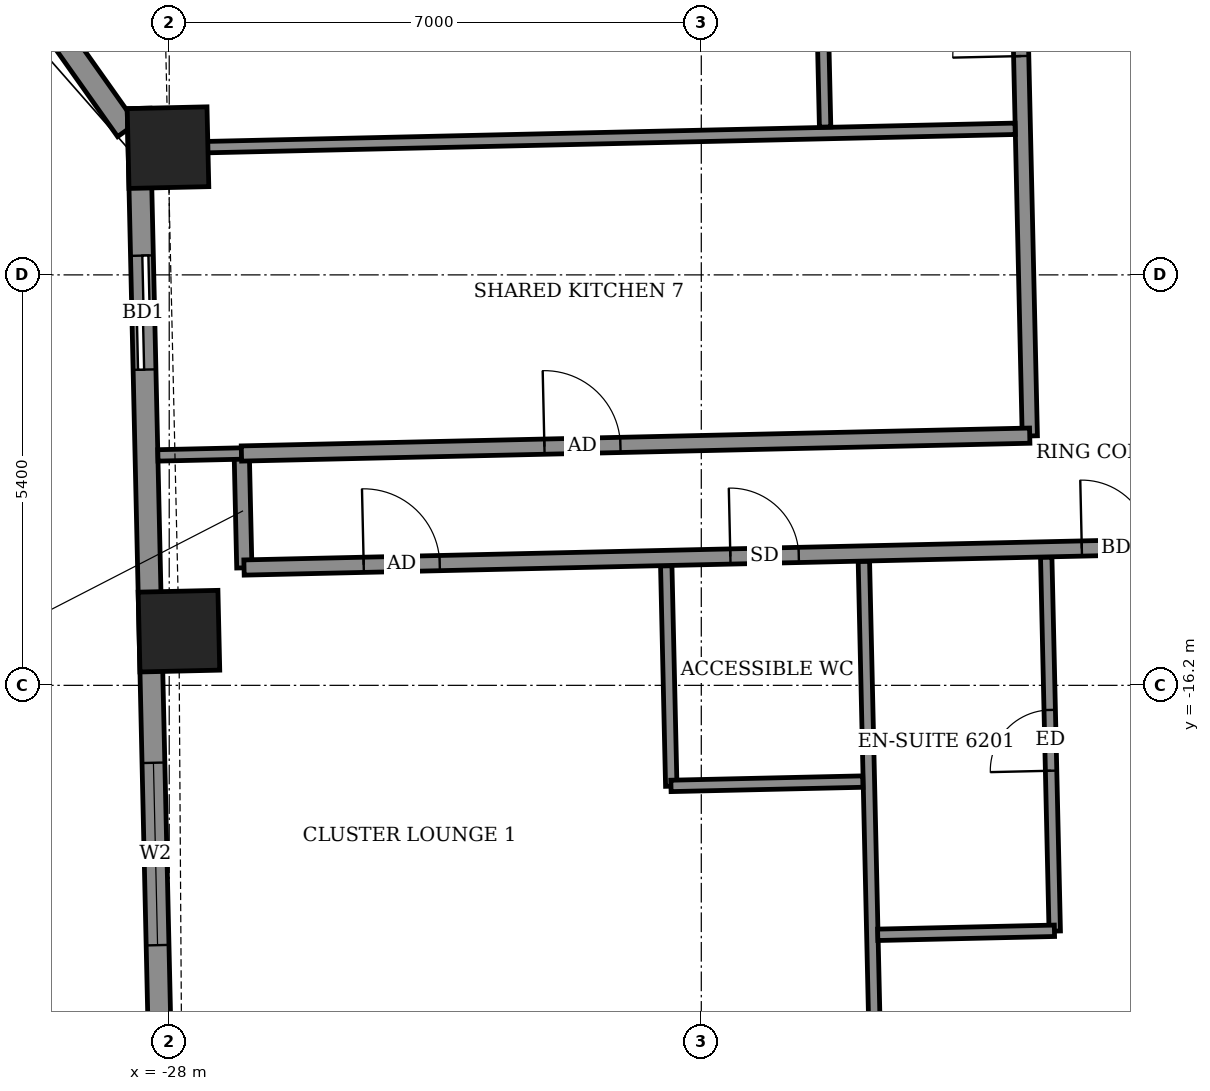
"""IFC4 building model, lengths in metres.
Left out: names, types, materials, properties, quantities, classifications, styles, units other than length and angle.
Written with IfcOpenShell. Run it as: python <this file> out.ifc"""

import sys

from ifc_helpers import new_model, si_unit, direction, frame, frame_2d, origin, origin_2d, place, context, subcontext, project, spatial, rectangle, extrude, element, fill, save


model = new_model("IFC4")
c1 = context("Model", 3, precision=1e-05, world=origin(), true_north=direction((0.0, 1.0)))
c2 = subcontext(c1, "Body", "Model", "MODEL_VIEW")
j1 = project(units=[si_unit("LENGTHUNIT", "METRE"), si_unit("PLANEANGLEUNIT", "RADIAN")], contexts=[c1])
p1 = place(None, origin())
s1 = spatial("IfcSite", under=j1, at=p1, CompositionType="ELEMENT")
p2 = place(p1, origin())
s2 = spatial("IfcBuilding", under=s1, at=p2, CompositionType="ELEMENT")
p3 = place(p2, frame((0.0, 0.0, 245.5)))
s3 = spatial("IfcBuildingStorey", under=s2, at=p3, CompositionType="ELEMENT", Elevation=245.5)
for number, where, z_axis, x_axis in (
    (1, (-28.016, -9.126, -0.55), (0.0, 0.0, 1.0), (0.023, -1.0, 0.0)),
    (2, (-27.872, -15.487, -0.55), (0.0, 0.0, 1.0), (0.023, -1.0, 0.0)),
):
    element("IfcColumn", number, at=place(p3, frame(where, z_axis=z_axis, x_axis=x_axis)), inside=s3, PredefinedType="COLUMN", context=c2, shape_type="SweptSolid", body=[
        extrude(rectangle(XDim=1.05, YDim=1.05, at=origin_2d()), origin(), (0.0, 0.0, 1.0), 3.6),
    ])
p4 = place(p3, frame((-30.62, -5.982, 0.0), z_axis=(0.0, 0.0, 1.0), x_axis=(0.578108441206, -0.815959943996, 0.0)))
e3 = element("IfcWall", 3, at=p4, inside=s3, PredefinedType="SOLIDWALL", context=c2, shape_type="SweptSolid", body=[
    extrude(rectangle(XDim=3.569, YDim=0.3, at=frame_2d((1.784, 0.0))), origin(), (0.0, 0.0, 1.0), 3.05),
])
p5 = place(p4, frame((0.338, 0.0, 0.9)))
e4 = element("IfcOpeningElement", 4, at=p5, cuts=e3, PredefinedType="OPENING", context=c2, shape_type="SweptSolid", body=[
    extrude(rectangle(XDim=1.2, YDim=1.5, at=frame_2d((0.6, 0.75))), frame((0.0, 0.16, 0.0), z_axis=(0.0, -1.0, 0.0), x_axis=(1.0, 0.0, 0.0)), (0.0, 0.0, 1.0), 0.32),
])
p6 = place(p3, frame((-28.403, -8.61, 0.0), z_axis=(0.0, 0.0, 1.0), x_axis=(0.022680342038, -0.999742767958, 0.0)))
e5 = element("IfcWall", 5, at=p6, inside=s3, PredefinedType="SOLIDWALL", context=c2, shape_type="SweptSolid", body=[
    extrude(rectangle(XDim=13.1, YDim=0.3, at=frame_2d((6.55, 0.0))), origin(), (0.0, 0.0, 1.0), 2.55),
])
p7 = place(p6, frame((1.937, 0.0, 0.0)))
e6 = element("IfcOpeningElement", 6, at=p7, cuts=e5, PredefinedType="OPENING", context=c2, shape_type="SweptSolid", body=[
    extrude(rectangle(XDim=1.5, YDim=2.4, at=frame_2d((0.75, 1.2))), frame((0.0, 0.16, 0.0), z_axis=(0.0, -1.0, 0.0), x_axis=(1.0, 0.0, 0.0)), (0.0, 0.0, 1.0), 0.32),
])
p8 = place(p6, frame((8.611, 0.0, 0.9)))
e7 = element("IfcOpeningElement", 7, at=p8, cuts=e5, PredefinedType="OPENING", context=c2, shape_type="SweptSolid", body=[
    extrude(rectangle(XDim=2.4, YDim=1.5, at=frame_2d((1.2, 0.75))), frame((0.0, 0.16, 0.0), z_axis=(0.0, -1.0, 0.0), x_axis=(1.0, 0.0, 0.0)), (0.0, 0.0, 1.0), 0.32),
])
p9 = place(p3, frame((-18.603, -25.942, 0.0), z_axis=(0.0, 0.0, 1.0), x_axis=(-0.022684842063, 0.99974266586, 0.0)))
e8 = element("IfcWall", 8, at=p9, inside=s3, PredefinedType="PARTITIONING", context=c2, shape_type="SweptSolid", body=[
    extrude(rectangle(XDim=11.376, YDim=0.15, at=frame_2d((5.688, 0.0))), origin(), (0.0, 0.0, 1.0), 2.55),
])
p10 = place(p3, frame((-16.35, -19.433, 0.0), z_axis=(0.0, 0.0, 1.0), x_axis=(-0.022724786614, 0.999741758692, 0.0)))
e9 = element("IfcWall", 9, at=p10, inside=s3, PredefinedType="PARTITIONING", context=c2, shape_type="SweptSolid", body=[
    extrude(rectangle(XDim=4.92, YDim=0.15, at=frame_2d((2.46, 0.0))), origin(), (0.0, 0.0, 1.0), 3.05),
])
p11 = place(p10, frame((2.11, 0.0, 0.0)))
e10 = element("IfcOpeningElement", 10, at=p11, cuts=e9, PredefinedType="OPENING", context=c2, shape_type="SweptSolid", body=[
    extrude(rectangle(XDim=0.8, YDim=2.1, at=frame_2d((0.4, 1.05))), frame((0.0, 0.085, 0.0), z_axis=(0.0, -1.0, 0.0), x_axis=(1.0, 0.0, 0.0)), (0.0, 0.0, 1.0), 0.17),
])
p12 = place(p3, frame((-18.679, -19.482, 0.0), z_axis=(0.0, 0.0, 1.0), x_axis=(0.999740478815, 0.022781023197, 0.0)))
e11 = element("IfcWall", 11, at=p12, inside=s3, PredefinedType="PARTITIONING", context=c2, shape_type="SweptSolid", body=[
    extrude(rectangle(XDim=2.325, YDim=0.15, at=frame_2d((1.163, 0.0))), origin(), (0.0, 0.0, 1.0), 3.05),
])
p13 = place(p3, frame((-21.395, -17.527, 0.0), z_axis=(0.0, 0.0, 1.0), x_axis=(-0.022730967319, 0.999741618182, 0.0)))
e12 = element("IfcWall", 12, at=p13, inside=s3, PredefinedType="PARTITIONING", context=c2, shape_type="SweptSolid", body=[
    extrude(rectangle(XDim=2.9, YDim=0.15, at=frame_2d((1.45, 0.0))), origin(), (0.0, 0.0, 1.0), 3.05),
])
p14 = place(p3, frame((-21.399, -17.523, 0.0), z_axis=(0.0, 0.0, 1.0), x_axis=(0.9997461113, 0.022532486354, 0.0)))
e13 = element("IfcWall", 13, at=p14, inside=s3, PredefinedType="PARTITIONING", context=c2, shape_type="SweptSolid", body=[
    extrude(rectangle(XDim=2.525, YDim=0.15, at=frame_2d((1.262, 0.0))), origin(), (0.0, 0.0, 1.0), 3.05),
])
p15 = place(p3, frame((-27.012, -14.654, 0.0), z_axis=(0.0, 0.0, 1.0), x_axis=(-0.022617910375, 0.999744182344, 0.0)))
e14 = element("IfcWall", 14, at=p15, inside=s3, PredefinedType="PARTITIONING", context=c2, shape_type="SweptSolid", body=[
    extrude(rectangle(XDim=1.5, YDim=0.2, at=frame_2d((0.75, 0.0))), origin(), (0.0, 0.0, 1.0), 3.05),
])
p16 = place(p3, frame((-27.016, -14.65, 0.0), z_axis=(0.0, 0.0, 1.0), x_axis=(0.999742874861, 0.022675629315, 0.0)))
e15 = element("IfcWall", 15, at=p16, inside=s3, PredefinedType="PARTITIONING", context=c2, shape_type="SweptSolid", body=[
    extrude(rectangle(XDim=50.883, YDim=0.2, at=frame_2d((25.442, 0.0))), origin(), (0.0, 0.0, 1.0), 3.05),
])
p17 = place(p16, frame((1.575, 0.0, 0.0)))
e16 = element("IfcOpeningElement", 16, at=p17, cuts=e15, PredefinedType="OPENING", context=c2, shape_type="SweptSolid", body=[
    extrude(rectangle(XDim=1.0, YDim=2.1, at=frame_2d((0.5, 1.05))), frame((0.0, 0.11, 0.0), z_axis=(0.0, -1.0, 0.0), x_axis=(1.0, 0.0, 0.0)), (0.0, 0.0, 1.0), 0.22),
])
p18 = place(p16, frame((6.4, 0.0, 0.0)))
e17 = element("IfcOpeningElement", 17, at=p18, cuts=e15, PredefinedType="OPENING", context=c2, shape_type="SweptSolid", body=[
    extrude(rectangle(XDim=0.9, YDim=2.1, at=frame_2d((0.45, 1.05))), frame((0.0, 0.11, 0.0), z_axis=(0.0, -1.0, 0.0), x_axis=(1.0, 0.0, 0.0)), (0.0, 0.0, 1.0), 0.22),
])
p19 = place(p16, frame((11.025, 0.0, 0.0)))
e18 = element("IfcOpeningElement", 18, at=p19, cuts=e15, PredefinedType="OPENING", context=c2, shape_type="SweptSolid", body=[
    extrude(rectangle(XDim=0.9, YDim=2.1, at=frame_2d((0.45, 1.05))), frame((0.0, 0.11, 0.0), z_axis=(0.0, -1.0, 0.0), x_axis=(1.0, 0.0, 0.0)), (0.0, 0.0, 1.0), 0.22),
])
p20 = place(p16, frame((12.925, 0.0, 0.0)))
e19 = element("IfcOpeningElement", 19, at=p20, cuts=e15, PredefinedType="OPENING", context=c2, shape_type="SweptSolid", body=[
    extrude(rectangle(XDim=0.9, YDim=2.1, at=frame_2d((0.45, 1.05))), frame((0.0, 0.11, 0.0), z_axis=(0.0, -1.0, 0.0), x_axis=(1.0, 0.0, 0.0)), (0.0, 0.0, 1.0), 0.22),
])
p21 = place(p16, frame((19.65, 0.0, 0.0)))
e20 = element("IfcOpeningElement", 20, at=p21, cuts=e15, PredefinedType="OPENING", context=c2, shape_type="SweptSolid", body=[
    extrude(rectangle(XDim=0.9, YDim=2.1, at=frame_2d((0.45, 1.05))), frame((0.0, 0.11, 0.0), z_axis=(0.0, -1.0, 0.0), x_axis=(1.0, 0.0, 0.0)), (0.0, 0.0, 1.0), 0.22),
])
p22 = place(p16, frame((21.575, 0.0, 0.0)))
e21 = element("IfcOpeningElement", 21, at=p22, cuts=e15, PredefinedType="OPENING", context=c2, shape_type="SweptSolid", body=[
    extrude(rectangle(XDim=0.9, YDim=2.1, at=frame_2d((0.45, 1.05))), frame((0.0, 0.11, 0.0), z_axis=(0.0, -1.0, 0.0), x_axis=(1.0, 0.0, 0.0)), (0.0, 0.0, 1.0), 0.22),
])
p23 = place(p16, frame((28.25, 0.0, 0.0)))
e22 = element("IfcOpeningElement", 22, at=p23, cuts=e15, PredefinedType="OPENING", context=c2, shape_type="SweptSolid", body=[
    extrude(rectangle(XDim=0.9, YDim=2.1, at=frame_2d((0.45, 1.05))), frame((0.0, 0.11, 0.0), z_axis=(0.0, -1.0, 0.0), x_axis=(1.0, 0.0, 0.0)), (0.0, 0.0, 1.0), 0.22),
])
p24 = place(p16, frame((30.125, 0.0, 0.0)))
e23 = element("IfcOpeningElement", 23, at=p24, cuts=e15, PredefinedType="OPENING", context=c2, shape_type="SweptSolid", body=[
    extrude(rectangle(XDim=0.9, YDim=2.1, at=frame_2d((0.45, 1.05))), frame((0.0, 0.11, 0.0), z_axis=(0.0, -1.0, 0.0), x_axis=(1.0, 0.0, 0.0)), (0.0, 0.0, 1.0), 0.22),
])
p25 = place(p16, frame((36.9, 0.0, 0.0)))
e24 = element("IfcOpeningElement", 24, at=p25, cuts=e15, PredefinedType="OPENING", context=c2, shape_type="SweptSolid", body=[
    extrude(rectangle(XDim=0.9, YDim=2.1, at=frame_2d((0.45, 1.05))), frame((0.0, 0.11, 0.0), z_axis=(0.0, -1.0, 0.0), x_axis=(1.0, 0.0, 0.0)), (0.0, 0.0, 1.0), 0.22),
])
p26 = place(p16, frame((38.85, 0.0, 0.0)))
e25 = element("IfcOpeningElement", 25, at=p26, cuts=e15, PredefinedType="OPENING", context=c2, shape_type="SweptSolid", body=[
    extrude(rectangle(XDim=0.9, YDim=2.1, at=frame_2d((0.45, 1.05))), frame((0.0, 0.11, 0.0), z_axis=(0.0, -1.0, 0.0), x_axis=(1.0, 0.0, 0.0)), (0.0, 0.0, 1.0), 0.22),
])
p27 = place(p16, frame((48.629, 0.0, 0.0)))
e26 = element("IfcOpeningElement", 26, at=p27, cuts=e15, PredefinedType="OPENING", context=c2, shape_type="SweptSolid", body=[
    extrude(rectangle(XDim=1.0, YDim=2.1, at=frame_2d((0.5, 1.05))), frame((0.0, 0.11, 0.0), z_axis=(0.0, -1.0, 0.0), x_axis=(1.0, 0.0, 0.0)), (0.0, 0.0, 1.0), 0.22),
])
p28 = place(p16, frame((43.6, 0.0, 0.0)))
e27 = element("IfcOpeningElement", 27, at=p28, cuts=e15, PredefinedType="OPENING", context=c2, shape_type="SweptSolid", body=[
    extrude(rectangle(XDim=0.9, YDim=2.1, at=frame_2d((0.45, 1.05))), frame((0.0, 0.11, 0.0), z_axis=(0.0, -1.0, 0.0), x_axis=(1.0, 0.0, 0.0)), (0.0, 0.0, 1.0), 0.22),
])
p29 = place(p3, frame((-16.678, -12.919, 0.0), z_axis=(0.0, 0.0, 1.0), x_axis=(-0.022696191528, 0.999742408268, 0.0)))
e28 = element("IfcWall", 28, at=p29, inside=s3, PredefinedType="PARTITIONING", context=c2, shape_type="SweptSolid", body=[
    extrude(rectangle(XDim=25.074, YDim=0.2, at=frame_2d((12.537, 0.0))), origin(), (0.0, 0.0, 1.0), 3.05),
])
p30 = place(p29, frame((19.537, 0.0, 0.0)))
e29 = element("IfcOpeningElement", 29, at=p30, cuts=e28, PredefinedType="OPENING", context=c2, shape_type="SweptSolid", body=[
    extrude(rectangle(XDim=1.0, YDim=2.1, at=frame_2d((0.5, 1.05))), frame((0.0, 0.11, 0.0), z_axis=(0.0, -1.0, 0.0), x_axis=(1.0, 0.0, 0.0)), (0.0, 0.0, 1.0), 0.22),
])
p31 = place(p29, frame((23.224, 0.0, 0.0)))
e30 = element("IfcOpeningElement", 30, at=p31, cuts=e28, PredefinedType="OPENING", context=c2, shape_type="SweptSolid", body=[
    extrude(rectangle(XDim=0.9, YDim=2.1, at=frame_2d((0.45, 1.05))), frame((0.0, 0.11, 0.0), z_axis=(0.0, -1.0, 0.0), x_axis=(1.0, 0.0, 0.0)), (0.0, 0.0, 1.0), 0.22),
])
p32 = place(p29, frame((13.849, 0.0, 0.0)))
e31 = element("IfcOpeningElement", 31, at=p32, cuts=e28, PredefinedType="OPENING", context=c2, shape_type="SweptSolid", body=[
    extrude(rectangle(XDim=1.0, YDim=2.1, at=frame_2d((0.5, 1.05))), frame((0.0, 0.11, 0.0), z_axis=(0.0, -1.0, 0.0), x_axis=(1.0, 0.0, 0.0)), (0.0, 0.0, 1.0), 0.22),
])
p33 = place(p29, frame((16.149, 0.0, 0.0)))
e32 = element("IfcOpeningElement", 32, at=p33, cuts=e28, PredefinedType="OPENING", context=c2, shape_type="SweptSolid", body=[
    extrude(rectangle(XDim=0.9, YDim=2.1, at=frame_2d((0.45, 1.05))), frame((0.0, 0.11, 0.0), z_axis=(0.0, -1.0, 0.0), x_axis=(1.0, 0.0, 0.0)), (0.0, 0.0, 1.0), 0.22),
])
p34 = place(p29, frame((11.849, 0.0, 0.0)))
e33 = element("IfcOpeningElement", 33, at=p34, cuts=e28, PredefinedType="OPENING", context=c2, shape_type="SweptSolid", body=[
    extrude(rectangle(XDim=1.0, YDim=2.1, at=frame_2d((0.5, 1.05))), frame((0.0, 0.11, 0.0), z_axis=(0.0, -1.0, 0.0), x_axis=(1.0, 0.0, 0.0)), (0.0, 0.0, 1.0), 0.22),
])
p35 = place(p29, frame((9.649, 0.0, 0.0)))
e34 = element("IfcOpeningElement", 34, at=p35, cuts=e28, PredefinedType="OPENING", context=c2, shape_type="SweptSolid", body=[
    extrude(rectangle(XDim=0.9, YDim=2.1, at=frame_2d((0.45, 1.05))), frame((0.0, 0.11, 0.0), z_axis=(0.0, -1.0, 0.0), x_axis=(1.0, 0.0, 0.0)), (0.0, 0.0, 1.0), 0.22),
])
p36 = place(p29, frame((7.324, 0.0, 0.0)))
e35 = element("IfcOpeningElement", 35, at=p36, cuts=e28, PredefinedType="OPENING", context=c2, shape_type="SweptSolid", body=[
    extrude(rectangle(XDim=1.0, YDim=2.1, at=frame_2d((0.5, 1.05))), frame((0.0, 0.11, 0.0), z_axis=(0.0, -1.0, 0.0), x_axis=(1.0, 0.0, 0.0)), (0.0, 0.0, 1.0), 0.22),
])
p37 = place(p29, frame((4.999, 0.0, 0.0)))
e36 = element("IfcOpeningElement", 36, at=p37, cuts=e28, PredefinedType="OPENING", context=c2, shape_type="SweptSolid", body=[
    extrude(rectangle(XDim=0.9, YDim=2.1, at=frame_2d((0.45, 1.05))), frame((0.0, 0.11, 0.0), z_axis=(0.0, -1.0, 0.0), x_axis=(1.0, 0.0, 0.0)), (0.0, 0.0, 1.0), 0.22),
])
p38 = place(p3, frame((-28.149, -13.175, 0.0), z_axis=(0.0, 0.0, 1.0), x_axis=(0.999740233734, 0.022791776024, 0.0)))
e37 = element("IfcWall", 37, at=p38, inside=s3, PredefinedType="PARTITIONING", context=c2, shape_type="SweptSolid", body=[
    extrude(rectangle(XDim=1.103, YDim=0.15, at=frame_2d((0.552, 0.0))), origin(), (0.0, 0.0, 1.0), 2.55),
])
p39 = place(p3, frame((-27.05, -13.15, 0.0), z_axis=(0.0, 0.0, 1.0), x_axis=(0.999743679035, 0.022640146404, 0.0)))
e38 = element("IfcWall", 38, at=p39, inside=s3, PredefinedType="PARTITIONING", context=c2, shape_type="SweptSolid", body=[
    extrude(rectangle(XDim=10.374, YDim=0.2, at=frame_2d((5.187, 0.0))), origin(), (0.0, 0.0, 1.0), 3.05),
])
p40 = place(p39, frame((3.987, 0.0, 0.0)))
e39 = element("IfcOpeningElement", 39, at=p40, cuts=e38, PredefinedType="OPENING", context=c2, shape_type="SweptSolid", body=[
    extrude(rectangle(XDim=1.0, YDim=2.1, at=frame_2d((0.5, 1.05))), frame((0.0, 0.11, 0.0), z_axis=(0.0, -1.0, 0.0), x_axis=(1.0, 0.0, 0.0)), (0.0, 0.0, 1.0), 0.22),
])
p41 = place(p3, frame((-28.241, -9.136, 0.0), z_axis=(0.0, 0.0, 1.0), x_axis=(0.999742533279, 0.022690684282, 0.0)))
e40 = element("IfcWall", 40, at=p41, inside=s3, PredefinedType="PARTITIONING", context=c2, shape_type="SweptSolid", body=[
    extrude(rectangle(XDim=11.373, YDim=0.15, at=frame_2d((5.687, 0.0))), origin(), (0.0, 0.0, 1.0), 3.05),
])
p42 = place(p3, frame((-19.371, -8.855, 0.0), z_axis=(0.0, 0.0, 1.0), x_axis=(-0.022760079124, 0.999740955847, 0.0)))
e41 = element("IfcWall", 41, at=p42, inside=s3, PredefinedType="PARTITIONING", context=c2, shape_type="SweptSolid", body=[
    extrude(rectangle(XDim=2.725, YDim=0.15, at=frame_2d((1.362, 0.0))), origin(), (0.0, 0.0, 1.0), 3.05),
])
p43 = place(p7, origin())
e42 = element("IfcDoor", 42, at=p43, inside=s3, OperationType="SLIDING_TO_LEFT", PredefinedType="DOOR", context=c2, shape_type="SweptSolid", body=[
    extrude(rectangle(XDim=1.5, YDim=2.4, at=frame_2d((0.75, 1.2))), frame((0.0, 0.025, 0.0), z_axis=(0.0, -1.0, 0.0), x_axis=(1.0, 0.0, 0.0)), (0.0, 0.0, 1.0), 0.05),
])
fill(e6, e42)
p44 = place(p8, origin())
e43 = element("IfcWindow", 43, at=p44, inside=s3, PartitioningType="DOUBLE_PANEL_VERTICAL", PredefinedType="WINDOW", context=c2, shape_type="SweptSolid", body=[
    extrude(rectangle(XDim=2.4, YDim=1.5, at=frame_2d((1.2, 0.75))), frame((0.0, 0.03, 0.0), z_axis=(0.0, -1.0, 0.0), x_axis=(1.0, 0.0, 0.0)), (0.0, 0.0, 1.0), 0.06),
])
fill(e7, e43)
p45 = place(p17, origin())
e44 = element("IfcDoor", 44, at=p45, inside=s3, OperationType="SINGLE_SWING_LEFT", PredefinedType="DOOR", context=c2, shape_type="SweptSolid", body=[
    extrude(rectangle(XDim=1.0, YDim=2.1, at=frame_2d((0.5, 1.05))), frame((0.0, 0.025, 0.0), z_axis=(0.0, -1.0, 0.0), x_axis=(1.0, 0.0, 0.0)), (0.0, 0.0, 1.0), 0.05),
])
fill(e16, e44)
p46 = place(p18, origin())
e45 = element("IfcDoor", 45, at=p46, inside=s3, OperationType="SINGLE_SWING_LEFT", PredefinedType="DOOR", context=c2, shape_type="SweptSolid", body=[
    extrude(rectangle(XDim=0.9, YDim=2.1, at=frame_2d((0.45, 1.05))), frame((0.0, 0.025, 0.0), z_axis=(0.0, -1.0, 0.0), x_axis=(1.0, 0.0, 0.0)), (0.0, 0.0, 1.0), 0.05),
])
fill(e17, e45)
p47 = place(p19, origin())
e46 = element("IfcDoor", 46, at=p47, inside=s3, OperationType="SINGLE_SWING_LEFT", PredefinedType="DOOR", context=c2, shape_type="SweptSolid", body=[
    extrude(rectangle(XDim=0.9, YDim=2.1, at=frame_2d((0.45, 1.05))), frame((0.0, 0.025, 0.0), z_axis=(0.0, -1.0, 0.0), x_axis=(1.0, 0.0, 0.0)), (0.0, 0.0, 1.0), 0.05),
])
fill(e18, e46)
p48 = place(p11, origin())
e47 = element("IfcDoor", 47, at=p48, inside=s3, OperationType="SINGLE_SWING_LEFT", PredefinedType="DOOR", context=c2, shape_type="SweptSolid", body=[
    extrude(rectangle(XDim=0.8, YDim=2.1, at=frame_2d((0.4, 1.05))), frame((0.0, 0.025, 0.0), z_axis=(0.0, -1.0, 0.0), x_axis=(1.0, 0.0, 0.0)), (0.0, 0.0, 1.0), 0.05),
])
fill(e10, e47)
p49 = place(p37, origin())
e48 = element("IfcDoor", 48, at=p49, inside=s3, OperationType="SINGLE_SWING_RIGHT", PredefinedType="DOOR", context=c2, shape_type="SweptSolid", body=[
    extrude(rectangle(XDim=0.9, YDim=2.1, at=frame_2d((0.45, 1.05))), frame((0.0, 0.025, 0.0), z_axis=(0.0, -1.0, 0.0), x_axis=(1.0, 0.0, 0.0)), (0.0, 0.0, 1.0), 0.05),
])
fill(e36, e48)
p50 = place(p40, origin())
e49 = element("IfcDoor", 49, at=p50, inside=s3, OperationType="SINGLE_SWING_LEFT", PredefinedType="DOOR", context=c2, shape_type="SweptSolid", body=[
    extrude(rectangle(XDim=1.0, YDim=2.1, at=frame_2d((0.5, 1.05))), frame((0.0, 0.025, 0.0), z_axis=(0.0, -1.0, 0.0), x_axis=(1.0, 0.0, 0.0)), (0.0, 0.0, 1.0), 0.05),
])
fill(e39, e49)
save(model, sys.argv[1])
